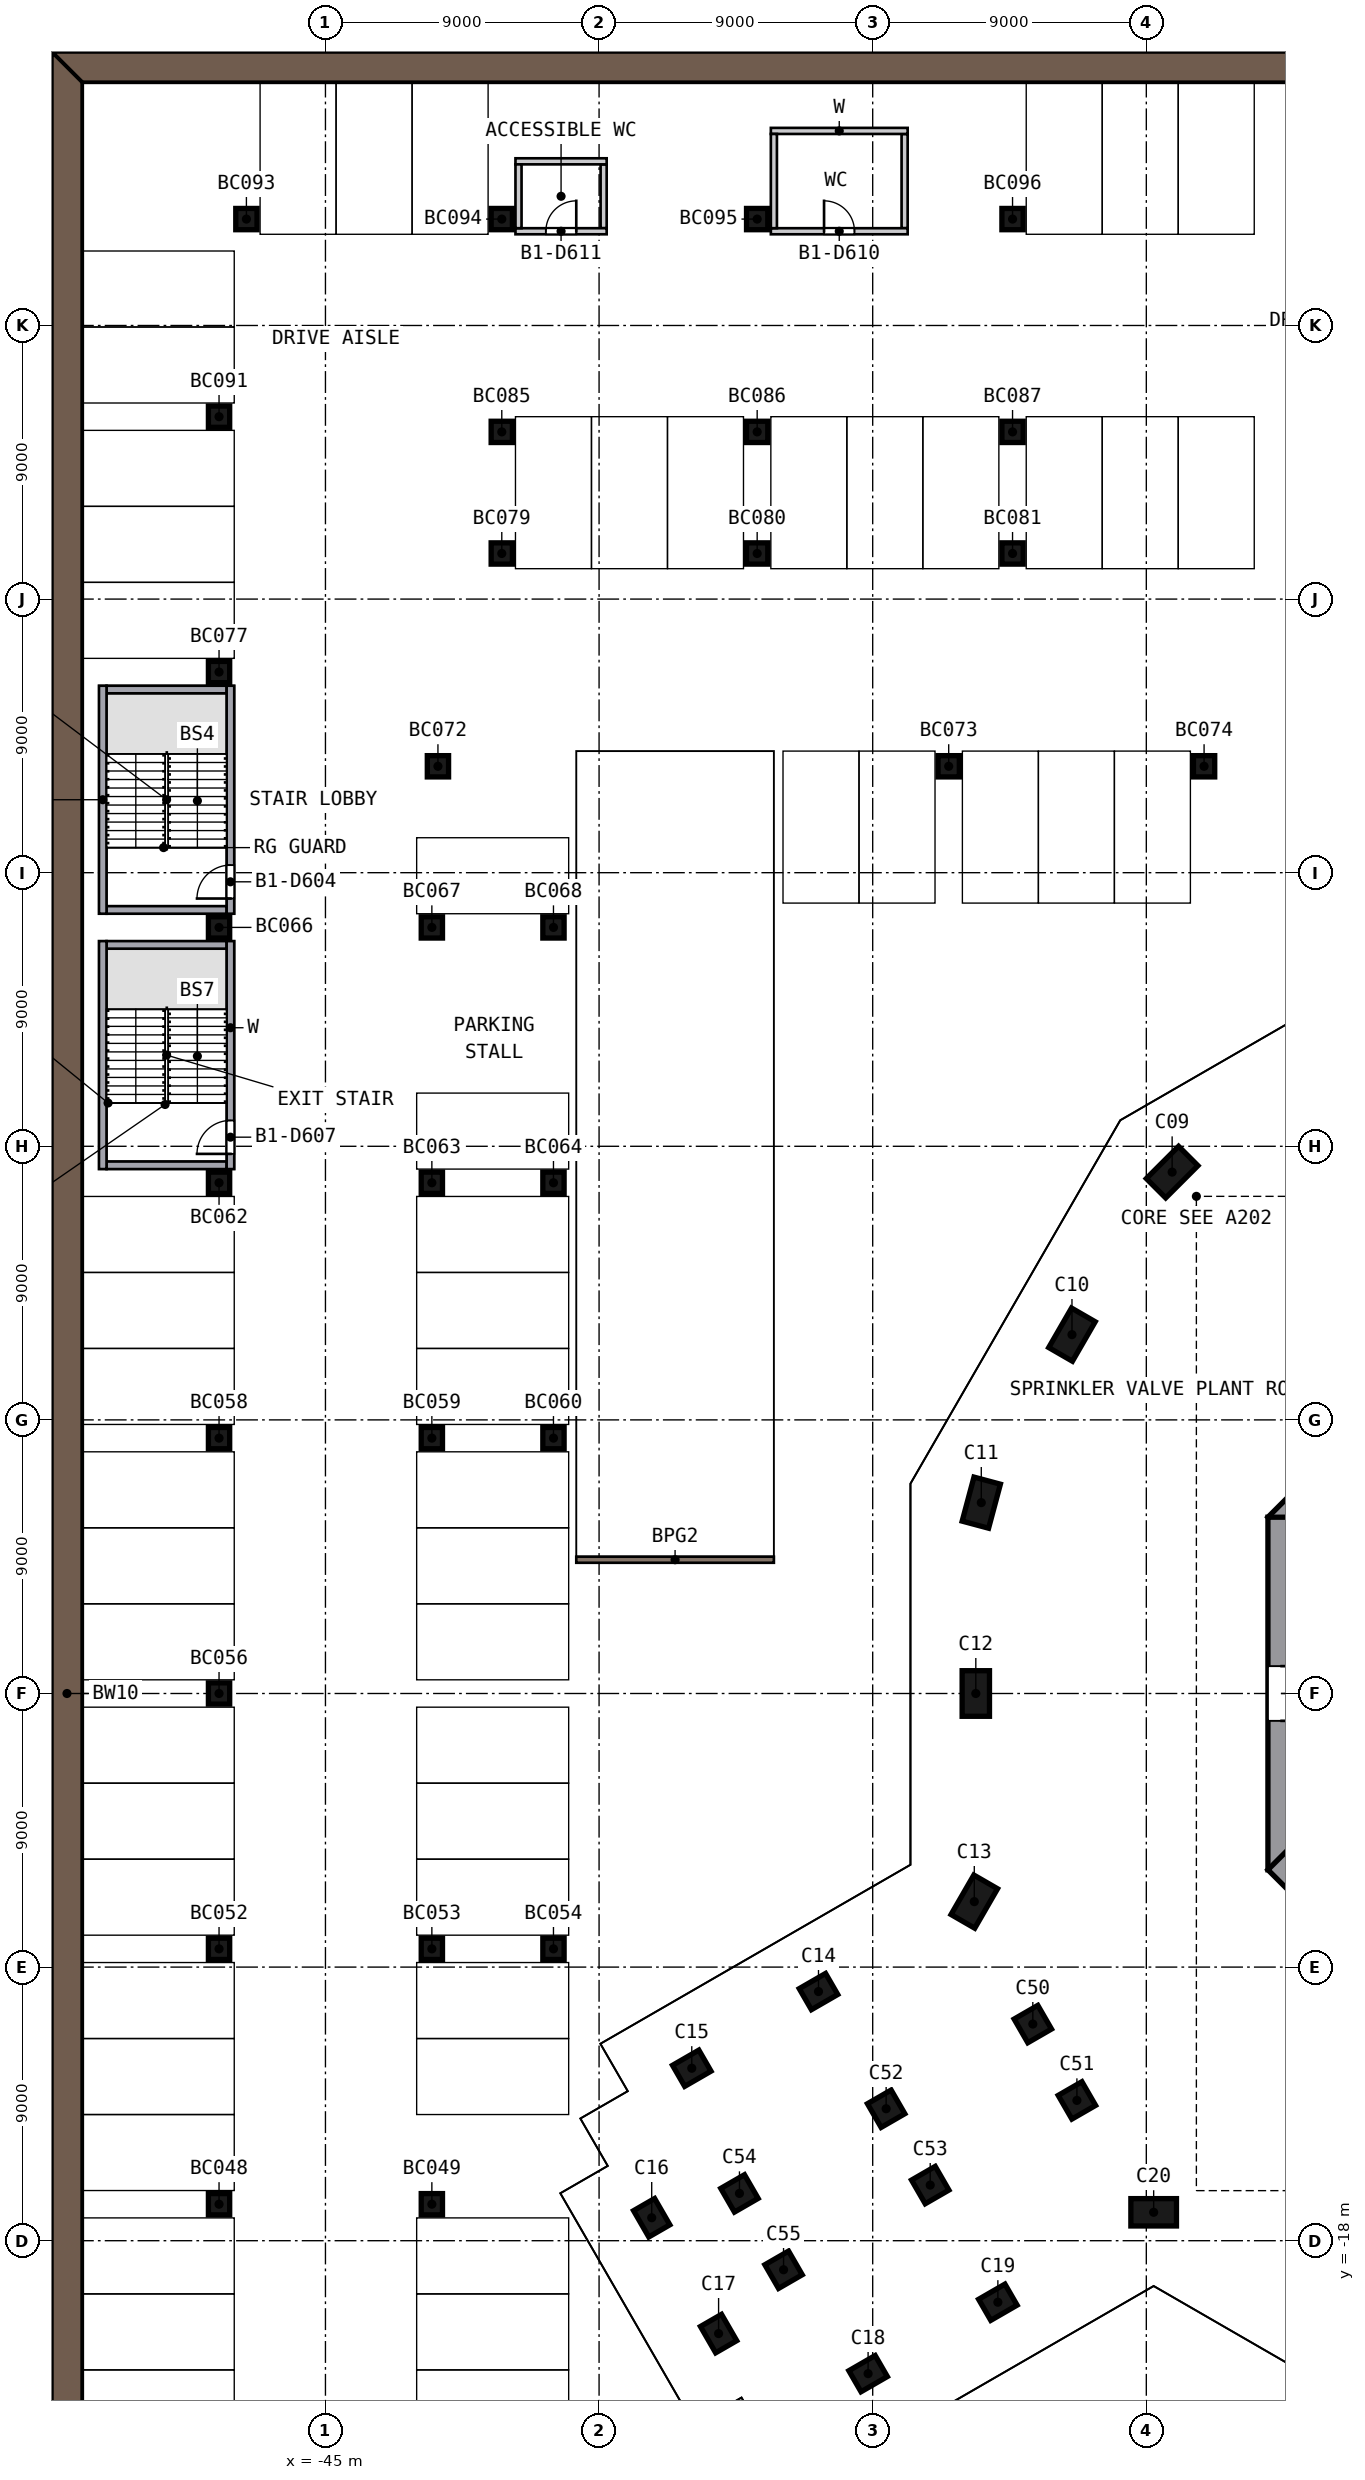
"""IFC4 building model, lengths in metres.
Left out: names, types, materials, properties, quantities, classifications, styles, units other than length and angle.
Written with IfcOpenShell. Run it as: python <this file> out.ifc"""

import sys

from ifc_helpers import new_model, si_unit, direction, frame, frame_2d, origin, origin_2d, place, context, subcontext, project, spatial, polyline, rectangle, outline, extrude, element, fill, save


model = new_model("IFC4")
c1 = context("Model", 3, precision=1e-05, world=origin(), true_north=direction((0.0, 1.0)))
c2 = subcontext(c1, "Body", "Model", "MODEL_VIEW")
j1 = project(units=[si_unit("LENGTHUNIT", "METRE"), si_unit("PLANEANGLEUNIT", "RADIAN")], contexts=[c1])
p1 = place(None, origin())
s1 = spatial("IfcSite", under=j1, at=p1, CompositionType="ELEMENT")
p2 = place(p1, origin())
s2 = spatial("IfcBuilding", under=s1, at=p2, CompositionType="ELEMENT")
p3 = place(p2, frame((0.0, 0.0, -3.9)))
s3 = spatial("IfcBuildingStorey", under=s2, at=p3, CompositionType="ELEMENT", Elevation=-3.9)
for number, where, z_axis, x_axis in (
    (1, (-17.151, 17.151, 0.0), (0.0, 0.0, 1.0), (0.707, 0.707, 0.0)),
    (2, (-20.445, 11.804, 0.0), (0.0, 0.0, 1.0), (-0.5, -0.866, 0.0)),
    (3, (-23.428, 6.278, 0.0), (0.0, 0.0, 1.0), (0.259, 0.966, 0.0)),
    (4, (-23.608, 0.0, 0.0), (0.0, 0.0, 1.0), (0.0, -1.0, 0.0)),
    (5, (-23.658, -6.846, 0.0), (0.0, 0.0, 1.0), (0.5, 0.866, 0.0)),
):
    element("IfcColumn", number, at=place(p3, frame(where, z_axis=z_axis, x_axis=x_axis)), inside=s3, PredefinedType="COLUMN", context=c2, shape_type="SweptSolid", body=[
        extrude(rectangle(XDim=1.5, YDim=0.9, at=origin_2d()), origin(), (0.0, 0.0, 1.0), 3.45),
    ])
for number, where, z_axis, x_axis in (
    (6, (-28.783, -9.805, 0.0), (0.0, 0.0, 1.0), (-0.866, -0.5, 0.0)),
    (7, (-32.951, -12.327, 0.0), (0.0, 0.0, 1.0), (-0.866, -0.5, 0.0)),
    (8, (-34.269, -17.245, 0.0), (0.0, 0.0, 1.0), (0.5, -0.866, 0.0)),
    (9, (-32.069, -21.055, 0.0), (0.0, 0.0, 1.0), (0.5, -0.866, 0.0)),
    (10, (-27.151, -22.373, 0.0), (0.0, 0.0, 1.0), (0.866, 0.5, 0.0)),
    (11, (-22.883, -20.024, 0.0), (0.0, 0.0, 1.0), (0.866, 0.5, 0.0)),
):
    element("IfcColumn", number, at=place(p3, frame(where, z_axis=z_axis, x_axis=x_axis)), inside=s3, PredefinedType="COLUMN", context=c2, shape_type="SweptSolid", body=[
        extrude(rectangle(XDim=1.0, YDim=0.8, at=origin_2d()), origin(), (0.0, 0.0, 1.0), 3.45),
    ])
p4 = place(p3, frame((-17.758, -17.065, 0.0), z_axis=(0.0, 0.0, 1.0), x_axis=(-1.0, 0.0, 0.0)))
e12 = element("IfcColumn", 12, at=p4, inside=s3, PredefinedType="COLUMN", context=c2, shape_type="SweptSolid", body=[
    extrude(rectangle(XDim=1.5, YDim=0.9, at=origin_2d()), origin(), (0.0, 0.0, 1.0), 3.45),
])
for number, where, z_axis, x_axis in (
    (13, (-21.733, -10.873, 0.0), (0.0, 0.0, 1.0), (-0.866, -0.5, 0.0)),
    (14, (-20.283, -13.385, 0.0), (0.0, 0.0, 1.0), (-0.866, -0.5, 0.0)),
    (15, (-26.558, -13.659, 0.0), (0.0, 0.0, 1.0), (-0.866, -0.5, 0.0)),
    (16, (-25.108, -16.17, 0.0), (0.0, 0.0, 1.0), (-0.866, -0.5, 0.0)),
    (17, (-31.382, -16.444, 0.0), (0.0, 0.0, 1.0), (-0.866, -0.5, 0.0)),
    (18, (-29.932, -18.956, 0.0), (0.0, 0.0, 1.0), (-0.866, -0.5, 0.0)),
):
    element("IfcColumn", number, at=place(p3, frame(where, z_axis=z_axis, x_axis=x_axis)), inside=s3, PredefinedType="COLUMN", context=c2, shape_type="SweptSolid", body=[
        extrude(rectangle(XDim=0.9, YDim=0.9, at=origin_2d()), origin(), (0.0, 0.0, 1.0), 3.45),
    ])
p5 = place(p3, frame((-5.481, 13.682, 0.0), z_axis=(0.0, 0.0, 1.0), x_axis=(-0.707106781, -0.707106781, 0.0)))
e19 = element("IfcWall", 19, at=p5, inside=s3, PredefinedType="SHEAR", context=c2, shape_type="SweptSolid", body=[
    extrude(rectangle(XDim=11.598, YDim=0.9, at=frame_2d((5.799, 0.0))), origin(), (0.0, 0.0, 1.0), 3.9),
])
p6 = place(p3, frame((-13.55, 5.799, 0.0), z_axis=(0.0, 0.0, 1.0), x_axis=(0.0, -1.0, 0.0)))
e20 = element("IfcWall", 20, at=p6, inside=s3, PredefinedType="SHEAR", context=c2, shape_type="SweptSolid", body=[
    extrude(rectangle(XDim=11.598, YDim=0.9, at=frame_2d((5.799, 0.0))), origin(), (0.0, 0.0, 1.0), 3.9),
])
p7 = place(p6, frame((4.899, 0.0, 0.0)))
e21 = element("IfcOpeningElement", 21, at=p7, cuts=e20, PredefinedType="OPENING", context=c2, shape_type="SweptSolid", body=[
    extrude(rectangle(XDim=1.8, YDim=2.1, at=frame_2d((0.9, 1.05))), frame((0.0, 0.46, 0.0), z_axis=(0.0, -1.0, 0.0), x_axis=(1.0, 0.0, 0.0)), (0.0, 0.0, 1.0), 0.92),
])
p8 = place(p3, frame((-13.682, -5.481, 0.0), z_axis=(0.0, 0.0, 1.0), x_axis=(0.707106781, -0.707106781, 0.0)))
e22 = element("IfcWall", 22, at=p8, inside=s3, PredefinedType="SHEAR", context=c2, shape_type="SweptSolid", body=[
    extrude(rectangle(XDim=11.598, YDim=0.9, at=frame_2d((5.799, 0.0))), origin(), (0.0, 0.0, 1.0), 3.9),
])
p9 = place(p3, origin())
e23 = element("IfcWall", 23, at=p9, inside=s3, PredefinedType="SOLIDWALL", context=c2, shape_type="SweptSolid", body=[
    extrude(outline(polyline([(54.0, 54.0), (-54.0, 54.0), (-53.0, 53.0), (53.0, 53.0), (54.0, 54.0)])), origin(), (0.0, 0.0, 1.0), 3.9),
])
p10 = place(p3, origin())
e24 = element("IfcWall", 24, at=p10, inside=s3, PredefinedType="SOLIDWALL", context=c2, shape_type="SweptSolid", body=[
    extrude(outline(polyline([(-54.0, 54.0), (-54.0, -54.0), (-53.0, -53.0), (-53.0, 53.0), (-54.0, 54.0)])), origin(), (0.0, 0.0, 1.0), 3.9),
])
for number, where, z_axis, x_axis in (
    (25, (-48.5, -16.8, 0.0), (0.0, 0.0, 1.0), (1.0, 0.0, 0.0)),
    (26, (-41.5, -16.8, 0.0), (0.0, 0.0, 1.0), (1.0, 0.0, 0.0)),
    (27, (-48.5, -8.4, 0.0), (0.0, 0.0, 1.0), (1.0, 0.0, 0.0)),
    (28, (-41.5, -8.4, 0.0), (0.0, 0.0, 1.0), (1.0, 0.0, 0.0)),
    (29, (-37.5, -8.4, 0.0), (0.0, 0.0, 1.0), (1.0, 0.0, 0.0)),
    (30, (-48.5, 0.0, 0.0), (0.0, 0.0, 1.0), (1.0, 0.0, 0.0)),
    (31, (-48.5, 8.4, 0.0), (0.0, 0.0, 1.0), (1.0, 0.0, 0.0)),
    (32, (-41.5, 8.4, 0.0), (0.0, 0.0, 1.0), (1.0, 0.0, 0.0)),
    (33, (-37.5, 8.4, 0.0), (0.0, 0.0, 1.0), (1.0, 0.0, 0.0)),
    (34, (-48.5, 16.8, 0.0), (0.0, 0.0, 1.0), (1.0, 0.0, 0.0)),
    (35, (-41.5, 16.8, 0.0), (0.0, 0.0, 1.0), (1.0, 0.0, 0.0)),
    (36, (-37.5, 16.8, 0.0), (0.0, 0.0, 1.0), (1.0, 0.0, 0.0)),
    (37, (-48.5, 25.2, 0.0), (0.0, 0.0, 1.0), (1.0, 0.0, 0.0)),
    (38, (-41.5, 25.2, 0.0), (0.0, 0.0, 1.0), (1.0, 0.0, 0.0)),
    (39, (-37.5, 25.2, 0.0), (0.0, 0.0, 1.0), (1.0, 0.0, 0.0)),
    (40, (-41.3, 30.5, 0.0), (0.0, 0.0, 1.0), (1.0, 0.0, 0.0)),
    (41, (-24.5, 30.5, 0.0), (0.0, 0.0, 1.0), (1.0, 0.0, 0.0)),
    (42, (-16.1, 30.5, 0.0), (0.0, 0.0, 1.0), (1.0, 0.0, 0.0)),
    (43, (-48.5, 33.6, 0.0), (0.0, 0.0, 1.0), (1.0, 0.0, 0.0)),
    (44, (-39.2, 37.5, 0.0), (0.0, 0.0, 1.0), (1.0, 0.0, 0.0)),
    (45, (-30.8, 37.5, 0.0), (0.0, 0.0, 1.0), (1.0, 0.0, 0.0)),
    (46, (-22.4, 37.5, 0.0), (0.0, 0.0, 1.0), (1.0, 0.0, 0.0)),
    (47, (-39.2, 41.5, 0.0), (0.0, 0.0, 1.0), (1.0, 0.0, 0.0)),
    (48, (-30.8, 41.5, 0.0), (0.0, 0.0, 1.0), (1.0, 0.0, 0.0)),
    (49, (-22.4, 41.5, 0.0), (0.0, 0.0, 1.0), (1.0, 0.0, 0.0)),
    (50, (-48.5, 42.0, 0.0), (0.0, 0.0, 1.0), (1.0, 0.0, 0.0)),
    (51, (-47.6, 48.5, 0.0), (0.0, 0.0, 1.0), (1.0, 0.0, 0.0)),
    (52, (-39.2, 48.5, 0.0), (0.0, 0.0, 1.0), (1.0, 0.0, 0.0)),
    (53, (-30.8, 48.5, 0.0), (0.0, 0.0, 1.0), (1.0, 0.0, 0.0)),
    (54, (-22.4, 48.5, 0.0), (0.0, 0.0, 1.0), (1.0, 0.0, 0.0)),
):
    element("IfcColumn", number, at=place(p3, frame(where, z_axis=z_axis, x_axis=x_axis)), inside=s3, PredefinedType="COLUMN", context=c2, shape_type="SweptSolid", body=[
        extrude(rectangle(XDim=0.7, YDim=0.7, at=origin_2d()), origin(), (0.0, 0.0, 1.0), 3.84),
    ])
p11 = place(p3, frame((-30.25, 4.4, 0.0), z_axis=(0.0, 0.0, 1.0), x_axis=(-1.0, 0.0, 0.0)))
e55 = element("IfcWall", 55, at=p11, inside=s3, PredefinedType="PARAPET", context=c2, shape_type="SweptSolid", body=[
    extrude(rectangle(XDim=6.5, YDim=0.2, at=frame_2d((3.25, 0.0))), origin(), (0.0, 0.0, 1.0), 1.12),
])
p12 = place(p3, frame((-52.325, 25.65, 0.0), z_axis=(0.0, 0.0, 1.0), x_axis=(0.0, 1.0, 0.0)))
e56 = element("IfcWall", 56, at=p12, inside=s3, PredefinedType="SOLIDWALL", context=c2, shape_type="SweptSolid", body=[
    extrude(rectangle(XDim=7.5, YDim=0.25, at=frame_2d((3.75, 0.0))), origin(), (0.0, 0.0, 1.0), 3.9),
])
p13 = place(p3, frame((-48.125, 25.65, 0.0), z_axis=(0.0, 0.0, 1.0), x_axis=(0.0, 1.0, 0.0)))
e57 = element("IfcWall", 57, at=p13, inside=s3, PredefinedType="SOLIDWALL", context=c2, shape_type="SweptSolid", body=[
    extrude(rectangle(XDim=7.5, YDim=0.25, at=frame_2d((3.75, 0.0))), origin(), (0.0, 0.0, 1.0), 3.9),
])
p14 = place(p13, frame((0.5, 0.0, 0.0)))
e58 = element("IfcOpeningElement", 58, at=p14, cuts=e57, PredefinedType="OPENING", context=c2, shape_type="SweptSolid", body=[
    extrude(rectangle(XDim=1.1, YDim=2.1, at=frame_2d((0.55, 1.05))), frame((0.0, 0.135, 0.0), z_axis=(0.0, -1.0, 0.0), x_axis=(1.0, 0.0, 0.0)), (0.0, 0.0, 1.0), 0.27),
])
for number, where, z_axis, x_axis in (
    (59, (-48.25, 25.775, 0.0), (0.0, 0.0, 1.0), (-1.0, 0.0, 0.0)),
    (60, (-48.25, 33.025, 0.0), (0.0, 0.0, 1.0), (-1.0, 0.0, 0.0)),
):
    element("IfcWall", number, at=place(p3, frame(where, z_axis=z_axis, x_axis=x_axis)), inside=s3, PredefinedType="SOLIDWALL", context=c2, shape_type="SweptSolid", body=[
        extrude(rectangle(XDim=3.95, YDim=0.25, at=frame_2d((1.975, 0.0))), origin(), (0.0, 0.0, 1.0), 3.9),
    ])
p15 = place(p3, frame((-52.325, 17.25, 0.0), z_axis=(0.0, 0.0, 1.0), x_axis=(0.0, 1.0, 0.0)))
e61 = element("IfcWall", 61, at=p15, inside=s3, PredefinedType="SOLIDWALL", context=c2, shape_type="SweptSolid", body=[
    extrude(rectangle(XDim=7.5, YDim=0.25, at=frame_2d((3.75, 0.0))), origin(), (0.0, 0.0, 1.0), 3.9),
])
p16 = place(p3, frame((-48.125, 17.25, 0.0), z_axis=(0.0, 0.0, 1.0), x_axis=(0.0, 1.0, 0.0)))
e62 = element("IfcWall", 62, at=p16, inside=s3, PredefinedType="SOLIDWALL", context=c2, shape_type="SweptSolid", body=[
    extrude(rectangle(XDim=7.5, YDim=0.25, at=frame_2d((3.75, 0.0))), origin(), (0.0, 0.0, 1.0), 3.9),
])
p17 = place(p16, frame((0.5, 0.0, 0.0)))
e63 = element("IfcOpeningElement", 63, at=p17, cuts=e62, PredefinedType="OPENING", context=c2, shape_type="SweptSolid", body=[
    extrude(rectangle(XDim=1.1, YDim=2.1, at=frame_2d((0.55, 1.05))), frame((0.0, 0.135, 0.0), z_axis=(0.0, -1.0, 0.0), x_axis=(1.0, 0.0, 0.0)), (0.0, 0.0, 1.0), 0.27),
])
for number, where, z_axis, x_axis in (
    (64, (-48.25, 17.375, 0.0), (0.0, 0.0, 1.0), (-1.0, 0.0, 0.0)),
    (65, (-48.25, 24.625, 0.0), (0.0, 0.0, 1.0), (-1.0, 0.0, 0.0)),
):
    element("IfcWall", number, at=place(p3, frame(where, z_axis=z_axis, x_axis=x_axis)), inside=s3, PredefinedType="SOLIDWALL", context=c2, shape_type="SweptSolid", body=[
        extrude(rectangle(XDim=3.95, YDim=0.25, at=frame_2d((1.975, 0.0))), origin(), (0.0, 0.0, 1.0), 3.9),
    ])
p18 = place(p3, frame((-30.35, 48.1, 0.0), z_axis=(0.0, 0.0, 1.0), x_axis=(1.0, 0.0, 0.0)))
e66 = element("IfcWall", 66, at=p18, inside=s3, PredefinedType="PARTITIONING", context=c2, shape_type="SweptSolid", body=[
    extrude(rectangle(XDim=4.5, YDim=0.2, at=frame_2d((2.25, 0.0))), origin(), (0.0, 0.0, 1.0), 3.3),
])
p19 = place(p18, frame((1.75, 0.0, 0.0)))
e67 = element("IfcOpeningElement", 67, at=p19, cuts=e66, PredefinedType="OPENING", context=c2, shape_type="SweptSolid", body=[
    extrude(rectangle(XDim=1.0, YDim=2.1, at=frame_2d((0.5, 1.05))), frame((0.0, 0.11, 0.0), z_axis=(0.0, -1.0, 0.0), x_axis=(1.0, 0.0, 0.0)), (0.0, 0.0, 1.0), 0.22),
])
p20 = place(p3, frame((-30.35, 51.4, 0.0), z_axis=(0.0, 0.0, 1.0), x_axis=(1.0, 0.0, 0.0)))
e68 = element("IfcWall", 68, at=p20, inside=s3, PredefinedType="PARTITIONING", context=c2, shape_type="SweptSolid", body=[
    extrude(rectangle(XDim=4.5, YDim=0.2, at=frame_2d((2.25, 0.0))), origin(), (0.0, 0.0, 1.0), 3.3),
])
for number, where, z_axis, x_axis in (
    (69, (-30.25, 48.2, 0.0), (0.0, 0.0, 1.0), (0.0, 1.0, 0.0)),
    (70, (-25.95, 48.2, 0.0), (0.0, 0.0, 1.0), (0.0, 1.0, 0.0)),
):
    element("IfcWall", number, at=place(p3, frame(where, z_axis=z_axis, x_axis=x_axis)), inside=s3, PredefinedType="PARTITIONING", context=c2, shape_type="SweptSolid", body=[
        extrude(rectangle(XDim=3.1, YDim=0.2, at=frame_2d((1.55, 0.0))), origin(), (0.0, 0.0, 1.0), 3.3),
    ])
p21 = place(p3, frame((-38.75, 48.1, 0.0), z_axis=(0.0, 0.0, 1.0), x_axis=(1.0, 0.0, 0.0)))
e71 = element("IfcWall", 71, at=p21, inside=s3, PredefinedType="PARTITIONING", context=c2, shape_type="SweptSolid", body=[
    extrude(rectangle(XDim=3.0, YDim=0.2, at=frame_2d((1.5, 0.0))), origin(), (0.0, 0.0, 1.0), 3.3),
])
p22 = place(p21, frame((1.0, 0.0, 0.0)))
e72 = element("IfcOpeningElement", 72, at=p22, cuts=e71, PredefinedType="OPENING", context=c2, shape_type="SweptSolid", body=[
    extrude(rectangle(XDim=1.0, YDim=2.1, at=frame_2d((0.5, 1.05))), frame((0.0, 0.11, 0.0), z_axis=(0.0, -1.0, 0.0), x_axis=(1.0, 0.0, 0.0)), (0.0, 0.0, 1.0), 0.22),
])
p23 = place(p3, frame((-38.75, 50.4, 0.0), z_axis=(0.0, 0.0, 1.0), x_axis=(1.0, 0.0, 0.0)))
e73 = element("IfcWall", 73, at=p23, inside=s3, PredefinedType="PARTITIONING", context=c2, shape_type="SweptSolid", body=[
    extrude(rectangle(XDim=3.0, YDim=0.2, at=frame_2d((1.5, 0.0))), origin(), (0.0, 0.0, 1.0), 3.3),
])
for number, where, z_axis, x_axis in (
    (74, (-38.65, 48.2, 0.0), (0.0, 0.0, 1.0), (0.0, 1.0, 0.0)),
    (75, (-35.85, 48.2, 0.0), (0.0, 0.0, 1.0), (0.0, 1.0, 0.0)),
):
    element("IfcWall", number, at=place(p3, frame(where, z_axis=z_axis, x_axis=x_axis)), inside=s3, PredefinedType="PARTITIONING", context=c2, shape_type="SweptSolid", body=[
        extrude(rectangle(XDim=2.1, YDim=0.2, at=frame_2d((1.05, 0.0))), origin(), (0.0, 0.0, 1.0), 3.3),
    ])
p24 = place(p7, origin())
e76 = element("IfcDoor", 76, at=p24, inside=s3, OperationType="DOUBLE_DOOR_SINGLE_SWING", PredefinedType="DOOR", context=c2, shape_type="SweptSolid", body=[
    extrude(rectangle(XDim=1.8, YDim=2.1, at=frame_2d((0.9, 1.05))), frame((0.0, 0.025, 0.0), z_axis=(0.0, -1.0, 0.0), x_axis=(1.0, 0.0, 0.0)), (0.0, 0.0, 1.0), 0.05),
])
fill(e21, e76)
p25 = place(p14, origin())
e77 = element("IfcDoor", 77, at=p25, inside=s3, OperationType="SINGLE_SWING_LEFT", PredefinedType="DOOR", context=c2, shape_type="SweptSolid", body=[
    extrude(rectangle(XDim=1.1, YDim=2.1, at=frame_2d((0.55, 1.05))), frame((0.0, 0.025, 0.0), z_axis=(0.0, -1.0, 0.0), x_axis=(1.0, 0.0, 0.0)), (0.0, 0.0, 1.0), 0.05),
])
fill(e58, e77)
p26 = place(p17, origin())
e78 = element("IfcDoor", 78, at=p26, inside=s3, OperationType="SINGLE_SWING_LEFT", PredefinedType="DOOR", context=c2, shape_type="SweptSolid", body=[
    extrude(rectangle(XDim=1.1, YDim=2.1, at=frame_2d((0.55, 1.05))), frame((0.0, 0.025, 0.0), z_axis=(0.0, -1.0, 0.0), x_axis=(1.0, 0.0, 0.0)), (0.0, 0.0, 1.0), 0.05),
])
fill(e63, e78)
p27 = place(p19, origin())
e79 = element("IfcDoor", 79, at=p27, inside=s3, OperationType="SINGLE_SWING_LEFT", PredefinedType="DOOR", context=c2, shape_type="SweptSolid", body=[
    extrude(rectangle(XDim=1.0, YDim=2.1, at=frame_2d((0.5, 1.05))), frame((0.0, 0.025, 0.0), z_axis=(0.0, -1.0, 0.0), x_axis=(1.0, 0.0, 0.0)), (0.0, 0.0, 1.0), 0.05),
])
fill(e67, e79)
p28 = place(p22, origin())
e80 = element("IfcDoor", 80, at=p28, inside=s3, OperationType="SINGLE_SWING_RIGHT", PredefinedType="DOOR", context=c2, shape_type="SweptSolid", body=[
    extrude(rectangle(XDim=1.0, YDim=2.1, at=frame_2d((0.5, 1.05))), frame((0.0, 0.025, 0.0), z_axis=(0.0, -1.0, 0.0), x_axis=(1.0, 0.0, 0.0)), (0.0, 0.0, 1.0), 0.05),
])
fill(e72, e80)
save(model, sys.argv[1])
